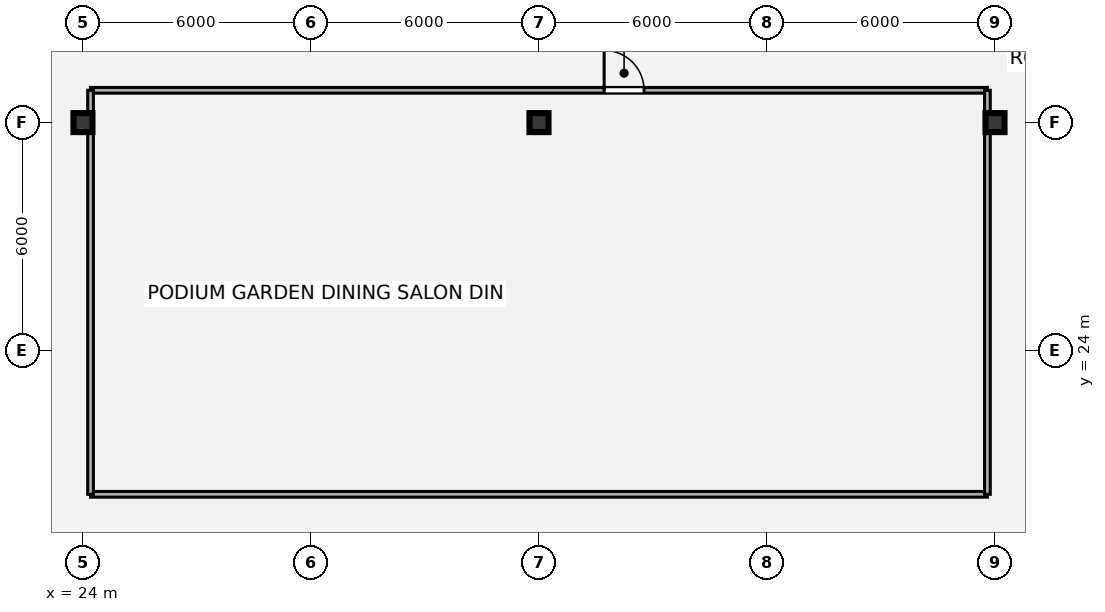
"""IFC4 building model, lengths in metres.
Left out: names, types, materials, properties, quantities, classifications, styles, units other than length and angle.
Written with IfcOpenShell. Run it as: python <this file> out.ifc"""

import sys

from ifc_helpers import new_model, si_unit, direction, frame, frame_2d, origin, origin_2d, place, context, subcontext, project, spatial, rectangle, i_section, extrude, source, transform, mapped, element, fill, save


model = new_model("IFC4")
c1 = context("Model", 3, precision=1e-05, world=origin(), true_north=direction((0.0, 1.0)))
c2 = subcontext(c1, "Body", "Model", "MODEL_VIEW")
j1 = project(units=[si_unit("LENGTHUNIT", "METRE"), si_unit("PLANEANGLEUNIT", "RADIAN")], contexts=[c1])
p1 = place(None, origin())
s1 = spatial("IfcSite", under=j1, at=p1, CompositionType="ELEMENT")
p2 = place(p1, origin())
s2 = spatial("IfcBuilding", under=s1, at=p2, CompositionType="ELEMENT")
p3 = place(p2, frame((0.0, 0.0, 18.36)))
s3 = spatial("IfcBuildingStorey", under=s2, at=p3, CompositionType="ELEMENT", Elevation=18.36)
m1 = source(origin(), c2, "Body", "SweptSolid", [
    extrude(i_section(OverallWidth=0.5, OverallDepth=0.5, WebThickness=0.022, FlangeThickness=0.035, at=origin_2d()), origin(), (0.0, 0.0, 1.0), 4.32),
])
for number, where, z_axis, x_axis in (
    (1, (24.0, 30.0, 0.0), (0.0, 0.0, 1.0), (1.0, 0.0, 0.0)),
    (2, (36.0, 30.0, 0.0), (0.0, 0.0, 1.0), (1.0, 0.0, 0.0)),
    (3, (48.0, 30.0, 0.0), (0.0, 0.0, 1.0), (1.0, 0.0, 0.0)),
):
    element("IfcColumn", number, at=place(p3, frame(where, z_axis=z_axis, x_axis=x_axis)), inside=s3, PredefinedType="COLUMN", context=c2, shape_type="MappedRepresentation", body=[
        mapped(m1, transform((0.0, 0.0, 0.0), x_axis=(1.0, 0.0, 0.0), y_axis=(0.0, 1.0, 0.0), z_axis=(0.0, 0.0, 1.0), scale=1.0)),
    ])
p4 = place(p3, frame((24.2, 20.22, 0.0), z_axis=(0.0, 0.0, 1.0), x_axis=(1.0, 0.0, 0.0)))
e4 = element("IfcWall", 4, at=p4, inside=s3, PredefinedType="PARTITIONING", context=c2, shape_type="SweptSolid", body=[
    extrude(rectangle(XDim=23.6, YDim=0.15, at=frame_2d((11.8, 0.0))), origin(), (0.0, 0.0, 1.0), 2.225),
])
p5 = place(p3, frame((24.2, 30.85, 0.0), z_axis=(0.0, 0.0, 1.0), x_axis=(1.0, 0.0, 0.0)))
e5 = element("IfcWall", 5, at=p5, inside=s3, PredefinedType="PARTITIONING", context=c2, shape_type="SweptSolid", body=[
    extrude(rectangle(XDim=23.6, YDim=0.15, at=frame_2d((11.8, 0.0))), origin(), (0.0, 0.0, 1.0), 4.01),
])
p6 = place(p5, frame((13.515, 0.0, 0.0)))
e6 = element("IfcOpeningElement", 6, at=p6, cuts=e5, PredefinedType="OPENING", context=c2, shape_type="SweptSolid", body=[
    extrude(rectangle(XDim=1.05, YDim=2.1, at=origin_2d()), frame((0.525, 0.085, 1.05), z_axis=(0.0, -1.0, 0.0), x_axis=(1.0, 0.0, 0.0)), (0.0, 0.0, 1.0), 0.17),
])
for number, where, z_axis, x_axis in (
    (7, (24.2, 20.22, 0.0), (0.0, 0.0, 1.0), (0.0, 1.0, 0.0)),
    (8, (47.8, 20.22, 0.0), (0.0, 0.0, 1.0), (0.0, 1.0, 0.0)),
):
    element("IfcWall", number, at=place(p3, frame(where, z_axis=z_axis, x_axis=x_axis)), inside=s3, PredefinedType="PARTITIONING", context=c2, shape_type="SweptSolid", body=[
        extrude(rectangle(XDim=10.63, YDim=0.15, at=frame_2d((5.315, 0.0))), origin(), (0.0, 0.0, 1.0), 2.225),
    ])
m2 = source(origin(), c2, "Body", "SweptSolid", [
    extrude(rectangle(XDim=1.05, YDim=2.1, at=origin_2d()), frame((0.525, 0.025, 1.05), z_axis=(0.0, -1.0, 0.0), x_axis=(1.0, 0.0, 0.0)), (0.0, 0.0, 1.0), 0.05),
])
p7 = place(p6, origin())
e9 = element("IfcDoor", 9, at=p7, inside=s3, OperationType="SINGLE_SWING_LEFT", PredefinedType="DOOR", context=c2, shape_type="MappedRepresentation", body=[
    mapped(m2, transform((0.0, 0.0, 0.0), x_axis=(1.0, 0.0, 0.0), y_axis=(0.0, 1.0, 0.0), z_axis=(0.0, 0.0, 1.0), scale=1.0)),
])
fill(e6, e9)
save(model, sys.argv[1])
